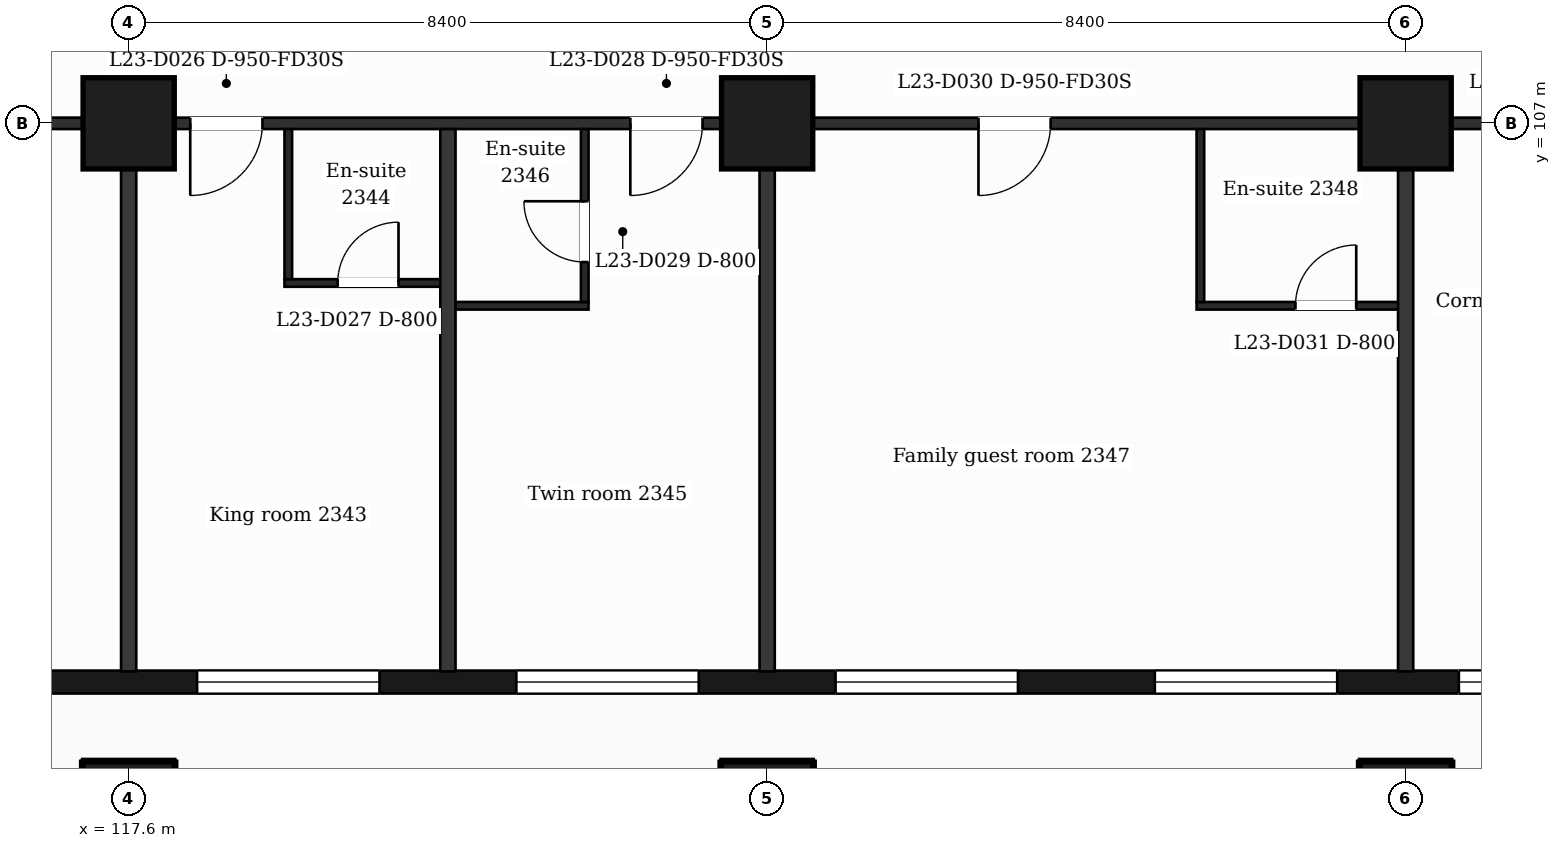
"""IFC4 building model, lengths in metres.
Left out: names, types, materials, properties, quantities, classifications, styles, units other than length and angle.
Written with IfcOpenShell. Run it as: python <this file> out.ifc"""

import sys

from ifc_helpers import new_model, si_unit, direction, frame, frame_2d, origin, origin_2d, place, context, subcontext, project, spatial, rectangle, extrude, element, fill, save


model = new_model("IFC4")
c1 = context("Model", 3, precision=1e-05, world=origin(), true_north=direction((0.0, 1.0)))
c2 = subcontext(c1, "Body", "Model", "MODEL_VIEW")
j1 = project(units=[si_unit("LENGTHUNIT", "METRE"), si_unit("PLANEANGLEUNIT", "RADIAN")], contexts=[c1])
p1 = place(None, origin())
s1 = spatial("IfcSite", under=j1, at=p1, CompositionType="ELEMENT")
p2 = place(p1, origin())
s2 = spatial("IfcBuilding", under=s1, at=p2, CompositionType="ELEMENT")
p3 = place(p2, frame((0.0, 0.0, 102.1)))
s3 = spatial("IfcBuildingStorey", under=s2, at=p3, CompositionType="ELEMENT", Elevation=102.1)
for number, where, z_axis, x_axis in (
    (1, (117.6, 98.0, 0.0), (0.0, 0.0, 1.0), (1.0, 0.0, 0.0)),
    (2, (126.0, 98.0, 0.0), (0.0, 0.0, 1.0), (1.0, 0.0, 0.0)),
    (3, (134.4, 98.0, 0.0), (0.0, 0.0, 1.0), (1.0, 0.0, 0.0)),
    (4, (117.6, 107.0, 0.0), (0.0, 0.0, 1.0), (1.0, 0.0, 0.0)),
    (5, (126.0, 107.0, 0.0), (0.0, 0.0, 1.0), (1.0, 0.0, 0.0)),
    (6, (134.4, 107.0, 0.0), (0.0, 0.0, 1.0), (1.0, 0.0, 0.0)),
):
    element("IfcColumn", number, at=place(p3, frame(where, z_axis=z_axis, x_axis=x_axis)), inside=s3, PredefinedType="COLUMN", context=c2, shape_type="SweptSolid", body=[
        extrude(rectangle(XDim=1.2, YDim=1.2, at=origin_2d()), origin(), (0.0, 0.0, 1.0), 3.7),
    ])
p4 = place(p3, frame((89.85, 99.65, 0.0), z_axis=(0.0, 0.0, 1.0), x_axis=(1.0, 0.0, 0.0)))
e7 = element("IfcWall", 7, at=p4, inside=s3, PredefinedType="SOLIDWALL", context=c2, shape_type="SweptSolid", body=[
    extrude(rectangle(XDim=47.25, YDim=0.3, at=frame_2d((23.625, 0.0))), origin(), (0.0, 0.0, 1.0), 3.38),
])
p5 = place(p4, frame((0.725, 0.0, 0.9)))
e8 = element("IfcOpeningElement", 8, at=p5, cuts=e7, PredefinedType="OPENING", context=c2, shape_type="SweptSolid", body=[
    extrude(rectangle(XDim=1.2, YDim=2.1, at=frame_2d((0.6, 1.05))), frame((0.0, 0.16, 0.0), z_axis=(0.0, -1.0, 0.0), x_axis=(1.0, 0.0, 0.0)), (0.0, 0.0, 1.0), 0.32),
])
p6 = place(p4, frame((3.45, 0.0, 0.9)))
e9 = element("IfcOpeningElement", 9, at=p6, cuts=e7, PredefinedType="OPENING", context=c2, shape_type="SweptSolid", body=[
    extrude(rectangle(XDim=2.4, YDim=2.1, at=frame_2d((1.2, 1.05))), frame((0.0, 0.16, 0.0), z_axis=(0.0, -1.0, 0.0), x_axis=(1.0, 0.0, 0.0)), (0.0, 0.0, 1.0), 0.32),
])
p7 = place(p4, frame((7.35, 0.0, 0.0)))
e10 = element("IfcOpeningElement", 10, at=p7, cuts=e7, PredefinedType="OPENING", context=c2, shape_type="SweptSolid", body=[
    extrude(rectangle(XDim=1.2, YDim=2.4, at=frame_2d((0.6, 1.2))), frame((0.0, 0.16, 0.0), z_axis=(0.0, -1.0, 0.0), x_axis=(1.0, 0.0, 0.0)), (0.0, 0.0, 1.0), 0.32),
])
p8 = place(p4, frame((9.15, 0.0, 0.9)))
e11 = element("IfcOpeningElement", 11, at=p8, cuts=e7, PredefinedType="OPENING", context=c2, shape_type="SweptSolid", body=[
    extrude(rectangle(XDim=1.2, YDim=2.1, at=frame_2d((0.6, 1.05))), frame((0.0, 0.16, 0.0), z_axis=(0.0, -1.0, 0.0), x_axis=(1.0, 0.0, 0.0)), (0.0, 0.0, 1.0), 0.32),
])
p9 = place(p4, frame((11.85, 0.0, 0.9)))
e12 = element("IfcOpeningElement", 12, at=p9, cuts=e7, PredefinedType="OPENING", context=c2, shape_type="SweptSolid", body=[
    extrude(rectangle(XDim=2.4, YDim=2.1, at=frame_2d((1.2, 1.05))), frame((0.0, 0.16, 0.0), z_axis=(0.0, -1.0, 0.0), x_axis=(1.0, 0.0, 0.0)), (0.0, 0.0, 1.0), 0.32),
])
p10 = place(p4, frame((16.05, 0.0, 0.9)))
e13 = element("IfcOpeningElement", 13, at=p10, cuts=e7, PredefinedType="OPENING", context=c2, shape_type="SweptSolid", body=[
    extrude(rectangle(XDim=2.4, YDim=2.1, at=frame_2d((1.2, 1.05))), frame((0.0, 0.16, 0.0), z_axis=(0.0, -1.0, 0.0), x_axis=(1.0, 0.0, 0.0)), (0.0, 0.0, 1.0), 0.32),
])
p11 = place(p4, frame((20.85, 0.0, 0.9)))
e14 = element("IfcOpeningElement", 14, at=p11, cuts=e7, PredefinedType="OPENING", context=c2, shape_type="SweptSolid", body=[
    extrude(rectangle(XDim=1.2, YDim=2.1, at=frame_2d((0.6, 1.05))), frame((0.0, 0.16, 0.0), z_axis=(0.0, -1.0, 0.0), x_axis=(1.0, 0.0, 0.0)), (0.0, 0.0, 1.0), 0.32),
])
p12 = place(p4, frame((25.05, 0.0, 0.9)))
e15 = element("IfcOpeningElement", 15, at=p12, cuts=e7, PredefinedType="OPENING", context=c2, shape_type="SweptSolid", body=[
    extrude(rectangle(XDim=1.2, YDim=2.1, at=frame_2d((0.6, 1.05))), frame((0.0, 0.16, 0.0), z_axis=(0.0, -1.0, 0.0), x_axis=(1.0, 0.0, 0.0)), (0.0, 0.0, 1.0), 0.32),
])
p13 = place(p4, frame((28.65, 0.0, 0.9)))
e16 = element("IfcOpeningElement", 16, at=p13, cuts=e7, PredefinedType="OPENING", context=c2, shape_type="SweptSolid", body=[
    extrude(rectangle(XDim=2.4, YDim=2.1, at=frame_2d((1.2, 1.05))), frame((0.0, 0.16, 0.0), z_axis=(0.0, -1.0, 0.0), x_axis=(1.0, 0.0, 0.0)), (0.0, 0.0, 1.0), 0.32),
])
p14 = place(p4, frame((32.85, 0.0, 0.9)))
e17 = element("IfcOpeningElement", 17, at=p14, cuts=e7, PredefinedType="OPENING", context=c2, shape_type="SweptSolid", body=[
    extrude(rectangle(XDim=2.4, YDim=2.1, at=frame_2d((1.2, 1.05))), frame((0.0, 0.16, 0.0), z_axis=(0.0, -1.0, 0.0), x_axis=(1.0, 0.0, 0.0)), (0.0, 0.0, 1.0), 0.32),
])
p15 = place(p4, frame((37.05, 0.0, 0.9)))
e18 = element("IfcOpeningElement", 18, at=p15, cuts=e7, PredefinedType="OPENING", context=c2, shape_type="SweptSolid", body=[
    extrude(rectangle(XDim=2.4, YDim=2.1, at=frame_2d((1.2, 1.05))), frame((0.0, 0.16, 0.0), z_axis=(0.0, -1.0, 0.0), x_axis=(1.0, 0.0, 0.0)), (0.0, 0.0, 1.0), 0.32),
])
p16 = place(p4, frame((41.25, 0.0, 0.9)))
e19 = element("IfcOpeningElement", 19, at=p16, cuts=e7, PredefinedType="OPENING", context=c2, shape_type="SweptSolid", body=[
    extrude(rectangle(XDim=2.4, YDim=2.1, at=frame_2d((1.2, 1.05))), frame((0.0, 0.16, 0.0), z_axis=(0.0, -1.0, 0.0), x_axis=(1.0, 0.0, 0.0)), (0.0, 0.0, 1.0), 0.32),
])
p17 = place(p4, frame((45.25, 0.0, 0.9)))
e20 = element("IfcOpeningElement", 20, at=p17, cuts=e7, PredefinedType="OPENING", context=c2, shape_type="SweptSolid", body=[
    extrude(rectangle(XDim=1.2, YDim=2.1, at=frame_2d((0.6, 1.05))), frame((0.0, 0.16, 0.0), z_axis=(0.0, -1.0, 0.0), x_axis=(1.0, 0.0, 0.0)), (0.0, 0.0, 1.0), 0.32),
])
p18 = place(p3, frame((121.8, 104.6, 0.0), z_axis=(0.0, 0.0, 1.0), x_axis=(1.0, 0.0, 0.0)))
e21 = element("IfcWall", 21, at=p18, inside=s3, PredefinedType="PARTITIONING", context=c2, shape_type="SweptSolid", body=[
    extrude(rectangle(XDim=1.85, YDim=0.1, at=frame_2d((0.925, 0.0))), origin(), (0.0, 0.0, 1.0), 3.38),
])
p19 = place(p3, frame((131.65, 104.6, 0.0), z_axis=(0.0, 0.0, 1.0), x_axis=(1.0, 0.0, 0.0)))
e22 = element("IfcWall", 22, at=p19, inside=s3, PredefinedType="PARTITIONING", context=c2, shape_type="SweptSolid", body=[
    extrude(rectangle(XDim=2.75, YDim=0.1, at=frame_2d((1.375, 0.0))), origin(), (0.0, 0.0, 1.0), 3.38),
])
p20 = place(p19, frame((1.3, 0.0, 0.0)))
e23 = element("IfcOpeningElement", 23, at=p20, cuts=e22, PredefinedType="OPENING", context=c2, shape_type="SweptSolid", body=[
    extrude(rectangle(XDim=0.8, YDim=2.1, at=frame_2d((0.4, 1.05))), frame((0.0, 0.06, 0.0), z_axis=(0.0, -1.0, 0.0), x_axis=(1.0, 0.0, 0.0)), (0.0, 0.0, 1.0), 0.12),
])
p21 = place(p3, frame((119.65, 104.9, 0.0), z_axis=(0.0, 0.0, 1.0), x_axis=(1.0, 0.0, 0.0)))
e24 = element("IfcWall", 24, at=p21, inside=s3, PredefinedType="PARTITIONING", context=c2, shape_type="SweptSolid", body=[
    extrude(rectangle(XDim=2.15, YDim=0.1, at=frame_2d((1.075, 0.0))), origin(), (0.0, 0.0, 1.0), 3.38),
])
p22 = place(p21, frame((0.7, 0.0, 0.0)))
e25 = element("IfcOpeningElement", 25, at=p22, cuts=e24, PredefinedType="OPENING", context=c2, shape_type="SweptSolid", body=[
    extrude(rectangle(XDim=0.8, YDim=2.1, at=frame_2d((0.4, 1.05))), frame((0.0, 0.06, 0.0), z_axis=(0.0, -1.0, 0.0), x_axis=(1.0, 0.0, 0.0)), (0.0, 0.0, 1.0), 0.12),
])
p23 = place(p3, frame((87.018, 107.0, 0.0), z_axis=(0.0, 0.0, 1.0), x_axis=(1.0, 0.0, 0.0)))
e26 = element("IfcWall", 26, at=p23, inside=s3, PredefinedType="PARTITIONING", context=c2, shape_type="SweptSolid", body=[
    extrude(rectangle(XDim=52.765, YDim=0.15, at=frame_2d((26.382, 0.0))), origin(), (0.0, 0.0, 1.0), 3.38),
])
p24 = place(p23, frame((1.276, 0.0, 0.0)))
e27 = element("IfcOpeningElement", 27, at=p24, cuts=e26, PredefinedType="OPENING", context=c2, shape_type="SweptSolid", body=[
    extrude(rectangle(XDim=0.95, YDim=2.1, at=frame_2d((0.475, 1.05))), frame((0.0, 0.085, 0.0), z_axis=(0.0, -1.0, 0.0), x_axis=(1.0, 0.0, 0.0)), (0.0, 0.0, 1.0), 0.17),
])
p25 = place(p23, frame((6.152, 0.0, 0.0)))
e28 = element("IfcOpeningElement", 28, at=p25, cuts=e26, PredefinedType="OPENING", context=c2, shape_type="SweptSolid", body=[
    extrude(rectangle(XDim=0.95, YDim=2.1, at=frame_2d((0.475, 1.05))), frame((0.0, 0.085, 0.0), z_axis=(0.0, -1.0, 0.0), x_axis=(1.0, 0.0, 0.0)), (0.0, 0.0, 1.0), 0.17),
])
p26 = place(p23, frame((14.59, 0.0, 0.0)))
e29 = element("IfcOpeningElement", 29, at=p26, cuts=e26, PredefinedType="OPENING", context=c2, shape_type="SweptSolid", body=[
    extrude(rectangle(XDim=0.95, YDim=2.1, at=frame_2d((0.475, 1.05))), frame((0.0, 0.085, 0.0), z_axis=(0.0, -1.0, 0.0), x_axis=(1.0, 0.0, 0.0)), (0.0, 0.0, 1.0), 0.17),
])
p27 = place(p23, frame((18.257, 0.0, 0.0)))
e30 = element("IfcOpeningElement", 30, at=p27, cuts=e26, PredefinedType="OPENING", context=c2, shape_type="SweptSolid", body=[
    extrude(rectangle(XDim=0.95, YDim=2.1, at=frame_2d((0.475, 1.05))), frame((0.0, 0.085, 0.0), z_axis=(0.0, -1.0, 0.0), x_axis=(1.0, 0.0, 0.0)), (0.0, 0.0, 1.0), 0.17),
])
p28 = place(p23, frame((26.672, 0.0, 0.0)))
e31 = element("IfcOpeningElement", 31, at=p28, cuts=e26, PredefinedType="OPENING", context=c2, shape_type="SweptSolid", body=[
    extrude(rectangle(XDim=0.95, YDim=2.1, at=frame_2d((0.475, 1.05))), frame((0.0, 0.085, 0.0), z_axis=(0.0, -1.0, 0.0), x_axis=(1.0, 0.0, 0.0)), (0.0, 0.0, 1.0), 0.17),
])
p29 = place(p23, frame((31.392, 0.0, 0.0)))
e32 = element("IfcOpeningElement", 32, at=p29, cuts=e26, PredefinedType="OPENING", context=c2, shape_type="SweptSolid", body=[
    extrude(rectangle(XDim=0.95, YDim=2.1, at=frame_2d((0.475, 1.05))), frame((0.0, 0.085, 0.0), z_axis=(0.0, -1.0, 0.0), x_axis=(1.0, 0.0, 0.0)), (0.0, 0.0, 1.0), 0.17),
])
p30 = place(p23, frame((37.182, 0.0, 0.0)))
e33 = element("IfcOpeningElement", 33, at=p30, cuts=e26, PredefinedType="OPENING", context=c2, shape_type="SweptSolid", body=[
    extrude(rectangle(XDim=0.95, YDim=2.1, at=frame_2d((0.475, 1.05))), frame((0.0, 0.085, 0.0), z_axis=(0.0, -1.0, 0.0), x_axis=(1.0, 0.0, 0.0)), (0.0, 0.0, 1.0), 0.17),
])
p31 = place(p23, frame((41.762, 0.0, 0.0)))
e34 = element("IfcOpeningElement", 34, at=p31, cuts=e26, PredefinedType="OPENING", context=c2, shape_type="SweptSolid", body=[
    extrude(rectangle(XDim=0.95, YDim=2.1, at=frame_2d((0.475, 1.05))), frame((0.0, 0.085, 0.0), z_axis=(0.0, -1.0, 0.0), x_axis=(1.0, 0.0, 0.0)), (0.0, 0.0, 1.0), 0.17),
])
p32 = place(p23, frame((49.285, 0.0, 0.0)))
e35 = element("IfcOpeningElement", 35, at=p32, cuts=e26, PredefinedType="OPENING", context=c2, shape_type="SweptSolid", body=[
    extrude(rectangle(XDim=0.95, YDim=2.1, at=frame_2d((0.475, 1.05))), frame((0.0, 0.085, 0.0), z_axis=(0.0, -1.0, 0.0), x_axis=(1.0, 0.0, 0.0)), (0.0, 0.0, 1.0), 0.17),
])
p33 = place(p3, frame((117.6, 99.79, 0.0), z_axis=(0.0, 0.0, 1.0), x_axis=(0.0, 1.0, 0.0)))
e36 = element("IfcWall", 36, at=p33, inside=s3, PredefinedType="PARTITIONING", context=c2, shape_type="SweptSolid", body=[
    extrude(rectangle(XDim=7.135, YDim=0.2, at=frame_2d((3.567, 0.0))), origin(), (0.0, 0.0, 1.0), 3.38),
])
p34 = place(p3, frame((119.7, 104.95, 0.0), z_axis=(0.0, 0.0, 1.0), x_axis=(0.0, 1.0, 0.0)))
e37 = element("IfcWall", 37, at=p34, inside=s3, PredefinedType="PARTITIONING", context=c2, shape_type="SweptSolid", body=[
    extrude(rectangle(XDim=1.975, YDim=0.1, at=frame_2d((0.988, 0.0))), origin(), (0.0, 0.0, 1.0), 3.38),
])
p35 = place(p3, frame((121.8, 99.79, 0.0), z_axis=(0.0, 0.0, 1.0), x_axis=(0.0, 1.0, 0.0)))
e38 = element("IfcWall", 38, at=p35, inside=s3, PredefinedType="PARTITIONING", context=c2, shape_type="SweptSolid", body=[
    extrude(rectangle(XDim=7.135, YDim=0.2, at=frame_2d((3.567, 0.0))), origin(), (0.0, 0.0, 1.0), 3.38),
])
p36 = place(p3, frame((123.6, 104.65, 0.0), z_axis=(0.0, 0.0, 1.0), x_axis=(0.0, 1.0, 0.0)))
e39 = element("IfcWall", 39, at=p36, inside=s3, PredefinedType="PARTITIONING", context=c2, shape_type="SweptSolid", body=[
    extrude(rectangle(XDim=2.275, YDim=0.1, at=frame_2d((1.138, 0.0))), origin(), (0.0, 0.0, 1.0), 3.38),
])
p37 = place(p36, frame((0.525, 0.0, 0.0)))
e40 = element("IfcOpeningElement", 40, at=p37, cuts=e39, PredefinedType="OPENING", context=c2, shape_type="SweptSolid", body=[
    extrude(rectangle(XDim=0.8, YDim=2.1, at=frame_2d((0.4, 1.05))), frame((0.0, 0.06, 0.0), z_axis=(0.0, -1.0, 0.0), x_axis=(1.0, 0.0, 0.0)), (0.0, 0.0, 1.0), 0.12),
])
p38 = place(p3, frame((126.0, 99.79, 0.0), z_axis=(0.0, 0.0, 1.0), x_axis=(0.0, 1.0, 0.0)))
e41 = element("IfcWall", 41, at=p38, inside=s3, PredefinedType="PARTITIONING", context=c2, shape_type="SweptSolid", body=[
    extrude(rectangle(XDim=7.135, YDim=0.2, at=frame_2d((3.567, 0.0))), origin(), (0.0, 0.0, 1.0), 3.38),
])
p39 = place(p3, frame((131.7, 104.65, 0.0), z_axis=(0.0, 0.0, 1.0), x_axis=(0.0, 1.0, 0.0)))
e42 = element("IfcWall", 42, at=p39, inside=s3, PredefinedType="PARTITIONING", context=c2, shape_type="SweptSolid", body=[
    extrude(rectangle(XDim=2.275, YDim=0.1, at=frame_2d((1.138, 0.0))), origin(), (0.0, 0.0, 1.0), 3.38),
])
p40 = place(p3, frame((134.4, 99.79, 0.0), z_axis=(0.0, 0.0, 1.0), x_axis=(0.0, 1.0, 0.0)))
e43 = element("IfcWall", 43, at=p40, inside=s3, PredefinedType="PARTITIONING", context=c2, shape_type="SweptSolid", body=[
    extrude(rectangle(XDim=7.135, YDim=0.2, at=frame_2d((3.567, 0.0))), origin(), (0.0, 0.0, 1.0), 3.38),
])
p41 = place(p13, origin())
e44 = element("IfcWindow", 44, at=p41, inside=s3, PartitioningType="SINGLE_PANEL", PredefinedType="WINDOW", context=c2, shape_type="SweptSolid", body=[
    extrude(rectangle(XDim=2.4, YDim=2.1, at=frame_2d((1.2, 1.05))), frame((0.0, 0.03, 0.0), z_axis=(0.0, -1.0, 0.0), x_axis=(1.0, 0.0, 0.0)), (0.0, 0.0, 1.0), 0.06),
])
fill(e16, e44)
p42 = place(p14, origin())
e45 = element("IfcWindow", 45, at=p42, inside=s3, PartitioningType="SINGLE_PANEL", PredefinedType="WINDOW", context=c2, shape_type="SweptSolid", body=[
    extrude(rectangle(XDim=2.4, YDim=2.1, at=frame_2d((1.2, 1.05))), frame((0.0, 0.03, 0.0), z_axis=(0.0, -1.0, 0.0), x_axis=(1.0, 0.0, 0.0)), (0.0, 0.0, 1.0), 0.06),
])
fill(e17, e45)
p43 = place(p15, origin())
e46 = element("IfcWindow", 46, at=p43, inside=s3, PartitioningType="SINGLE_PANEL", PredefinedType="WINDOW", context=c2, shape_type="SweptSolid", body=[
    extrude(rectangle(XDim=2.4, YDim=2.1, at=frame_2d((1.2, 1.05))), frame((0.0, 0.03, 0.0), z_axis=(0.0, -1.0, 0.0), x_axis=(1.0, 0.0, 0.0)), (0.0, 0.0, 1.0), 0.06),
])
fill(e18, e46)
p44 = place(p16, origin())
e47 = element("IfcWindow", 47, at=p44, inside=s3, PartitioningType="SINGLE_PANEL", PredefinedType="WINDOW", context=c2, shape_type="SweptSolid", body=[
    extrude(rectangle(XDim=2.4, YDim=2.1, at=frame_2d((1.2, 1.05))), frame((0.0, 0.03, 0.0), z_axis=(0.0, -1.0, 0.0), x_axis=(1.0, 0.0, 0.0)), (0.0, 0.0, 1.0), 0.06),
])
fill(e19, e47)
p45 = place(p17, origin())
e48 = element("IfcWindow", 48, at=p45, inside=s3, PartitioningType="SINGLE_PANEL", PredefinedType="WINDOW", context=c2, shape_type="SweptSolid", body=[
    extrude(rectangle(XDim=1.2, YDim=2.1, at=frame_2d((0.6, 1.05))), frame((0.0, 0.03, 0.0), z_axis=(0.0, -1.0, 0.0), x_axis=(1.0, 0.0, 0.0)), (0.0, 0.0, 1.0), 0.06),
])
fill(e20, e48)
p46 = place(p29, origin())
e49 = element("IfcDoor", 49, at=p46, inside=s3, OperationType="SINGLE_SWING_LEFT", PredefinedType="DOOR", context=c2, shape_type="SweptSolid", body=[
    extrude(rectangle(XDim=0.95, YDim=2.1, at=frame_2d((0.475, 1.05))), frame((0.0, 0.025, 0.0), z_axis=(0.0, -1.0, 0.0), x_axis=(1.0, 0.0, 0.0)), (0.0, 0.0, 1.0), 0.05),
])
fill(e32, e49)
p47 = place(p22, origin())
e50 = element("IfcDoor", 50, at=p47, inside=s3, OperationType="SINGLE_SWING_RIGHT", PredefinedType="DOOR", context=c2, shape_type="SweptSolid", body=[
    extrude(rectangle(XDim=0.8, YDim=2.1, at=frame_2d((0.4, 1.05))), frame((0.0, 0.025, 0.0), z_axis=(0.0, -1.0, 0.0), x_axis=(1.0, 0.0, 0.0)), (0.0, 0.0, 1.0), 0.05),
])
fill(e25, e50)
p48 = place(p30, origin())
e51 = element("IfcDoor", 51, at=p48, inside=s3, OperationType="SINGLE_SWING_LEFT", PredefinedType="DOOR", context=c2, shape_type="SweptSolid", body=[
    extrude(rectangle(XDim=0.95, YDim=2.1, at=frame_2d((0.475, 1.05))), frame((0.0, 0.025, 0.0), z_axis=(0.0, -1.0, 0.0), x_axis=(1.0, 0.0, 0.0)), (0.0, 0.0, 1.0), 0.05),
])
fill(e33, e51)
p49 = place(p37, origin())
e52 = element("IfcDoor", 52, at=p49, inside=s3, OperationType="SINGLE_SWING_RIGHT", PredefinedType="DOOR", context=c2, shape_type="SweptSolid", body=[
    extrude(rectangle(XDim=0.8, YDim=2.1, at=frame_2d((0.4, 1.05))), frame((0.0, 0.025, 0.0), z_axis=(0.0, -1.0, 0.0), x_axis=(1.0, 0.0, 0.0)), (0.0, 0.0, 1.0), 0.05),
])
fill(e40, e52)
p50 = place(p31, origin())
e53 = element("IfcDoor", 53, at=p50, inside=s3, OperationType="SINGLE_SWING_LEFT", PredefinedType="DOOR", context=c2, shape_type="SweptSolid", body=[
    extrude(rectangle(XDim=0.95, YDim=2.1, at=frame_2d((0.475, 1.05))), frame((0.0, 0.025, 0.0), z_axis=(0.0, -1.0, 0.0), x_axis=(1.0, 0.0, 0.0)), (0.0, 0.0, 1.0), 0.05),
])
fill(e34, e53)
p51 = place(p20, origin())
e54 = element("IfcDoor", 54, at=p51, inside=s3, OperationType="SINGLE_SWING_RIGHT", PredefinedType="DOOR", context=c2, shape_type="SweptSolid", body=[
    extrude(rectangle(XDim=0.8, YDim=2.1, at=frame_2d((0.4, 1.05))), frame((0.0, 0.025, 0.0), z_axis=(0.0, -1.0, 0.0), x_axis=(1.0, 0.0, 0.0)), (0.0, 0.0, 1.0), 0.05),
])
fill(e23, e54)
save(model, sys.argv[1])
